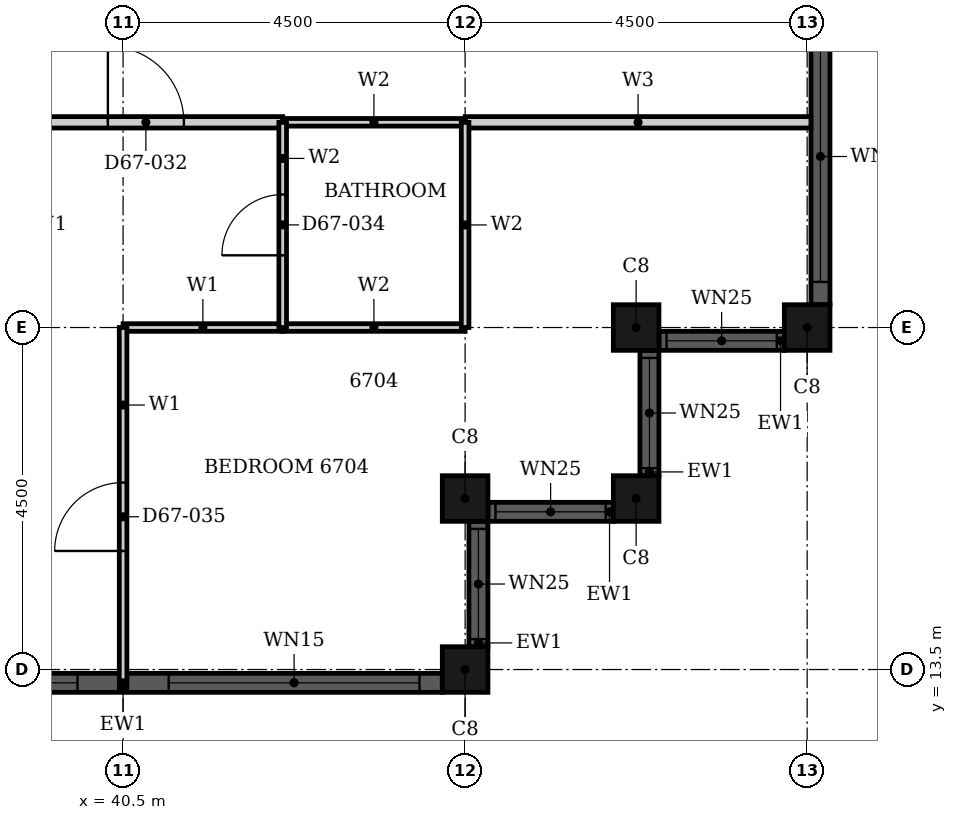
"""IFC4 building model, lengths in metres.
Left out: names, types, materials, properties, quantities, classifications, styles, units other than length and angle.
Written with IfcOpenShell. Run it as: python <this file> out.ifc"""

import sys

from ifc_helpers import new_model, si_unit, direction, frame, frame_2d, origin, origin_2d, place, context, subcontext, project, spatial, rectangle, hollow_rectangle, extrude, element, fill, save


model = new_model("IFC4")
c1 = context("Model", 3, precision=1e-05, world=origin(), true_north=direction((0.0, 1.0)))
c2 = subcontext(c1, "Body", "Model", "MODEL_VIEW")
j1 = project(units=[si_unit("LENGTHUNIT", "METRE"), si_unit("PLANEANGLEUNIT", "RADIAN")], contexts=[c1])
p1 = place(None, origin())
s1 = spatial("IfcSite", under=j1, at=p1, CompositionType="ELEMENT")
p2 = place(p1, origin())
s2 = spatial("IfcBuilding", under=s1, at=p2, CompositionType="ELEMENT")
p3 = place(p2, frame((0.0, 0.0, 263.8)))
s3 = spatial("IfcBuildingStorey", under=s2, at=p3, CompositionType="ELEMENT", Elevation=263.8)
for number, where, z_axis, x_axis in (
    (1, (45.0, 13.5, 0.0), (0.0, 0.0, 1.0), (1.0, 0.0, 0.0)),
    (2, (45.0, 15.75, 0.0), (0.0, 0.0, 1.0), (1.0, 0.0, 0.0)),
    (3, (47.25, 15.75, 0.0), (0.0, 0.0, 1.0), (1.0, 0.0, 0.0)),
    (4, (47.25, 18.0, 0.0), (0.0, 0.0, 1.0), (1.0, 0.0, 0.0)),
    (5, (49.5, 18.0, 0.0), (0.0, 0.0, 1.0), (1.0, 0.0, 0.0)),
):
    element("IfcColumn", number, at=place(p3, frame(where, z_axis=z_axis, x_axis=x_axis)), inside=s3, PredefinedType="COLUMN", context=c2, shape_type="SweptSolid", body=[
        extrude(hollow_rectangle(XDim=0.6, YDim=0.6, WallThickness=0.02, at=origin_2d()), origin(), (0.0, 0.0, 1.0), 3.7),
    ])
p4 = place(p3, frame((36.3, 13.325, 0.0), z_axis=(0.0, 0.0, 1.0), x_axis=(1.0, 0.0, 0.0)))
e6 = element("IfcWall", 6, at=p4, inside=s3, PredefinedType="SOLIDWALL", context=c2, shape_type="SweptSolid", body=[
    extrude(rectangle(XDim=8.4, YDim=0.25, at=frame_2d((4.2, 0.0))), origin(), (0.0, 0.0, 1.0), 3.7),
])
p5 = place(p4, frame((0.3, 0.0, 0.45)))
e7 = element("IfcOpeningElement", 7, at=p5, cuts=e6, PredefinedType="OPENING", context=c2, shape_type="SweptSolid", body=[
    extrude(rectangle(XDim=3.3, YDim=2.3, at=frame_2d((1.65, 1.15))), frame((0.0, 0.135, 0.0), z_axis=(0.0, -1.0, 0.0), x_axis=(1.0, 0.0, 0.0)), (0.0, 0.0, 1.0), 0.27),
])
p6 = place(p4, frame((4.8, 0.0, 0.45)))
e8 = element("IfcOpeningElement", 8, at=p6, cuts=e6, PredefinedType="OPENING", context=c2, shape_type="SweptSolid", body=[
    extrude(rectangle(XDim=3.3, YDim=2.3, at=frame_2d((1.65, 1.15))), frame((0.0, 0.135, 0.0), z_axis=(0.0, -1.0, 0.0), x_axis=(1.0, 0.0, 0.0)), (0.0, 0.0, 1.0), 0.27),
])
p7 = place(p3, frame((45.175, 13.8, 0.0), z_axis=(0.0, 0.0, 1.0), x_axis=(0.0, 1.0, 0.0)))
e9 = element("IfcWall", 9, at=p7, inside=s3, PredefinedType="SOLIDWALL", context=c2, shape_type="SweptSolid", body=[
    extrude(rectangle(XDim=1.65, YDim=0.25, at=frame_2d((0.825, 0.0))), origin(), (0.0, 0.0, 1.0), 3.7),
])
p8 = place(p7, frame((0.1, 0.0, 0.9)))
e10 = element("IfcOpeningElement", 10, at=p8, cuts=e9, PredefinedType="OPENING", context=c2, shape_type="SweptSolid", body=[
    extrude(rectangle(XDim=1.45, YDim=1.85, at=frame_2d((0.725, 0.925))), frame((0.0, 0.135, 0.0), z_axis=(0.0, -1.0, 0.0), x_axis=(1.0, 0.0, 0.0)), (0.0, 0.0, 1.0), 0.27),
])
p9 = place(p3, frame((45.3, 15.575, 0.0), z_axis=(0.0, 0.0, 1.0), x_axis=(1.0, 0.0, 0.0)))
e11 = element("IfcWall", 11, at=p9, inside=s3, PredefinedType="SOLIDWALL", context=c2, shape_type="SweptSolid", body=[
    extrude(rectangle(XDim=1.65, YDim=0.25, at=frame_2d((0.825, 0.0))), origin(), (0.0, 0.0, 1.0), 3.7),
])
p10 = place(p9, frame((0.1, 0.0, 0.9)))
e12 = element("IfcOpeningElement", 12, at=p10, cuts=e11, PredefinedType="OPENING", context=c2, shape_type="SweptSolid", body=[
    extrude(rectangle(XDim=1.45, YDim=1.85, at=frame_2d((0.725, 0.925))), frame((0.0, 0.135, 0.0), z_axis=(0.0, -1.0, 0.0), x_axis=(1.0, 0.0, 0.0)), (0.0, 0.0, 1.0), 0.27),
])
p11 = place(p3, frame((47.425, 16.05, 0.0), z_axis=(0.0, 0.0, 1.0), x_axis=(0.0, 1.0, 0.0)))
e13 = element("IfcWall", 13, at=p11, inside=s3, PredefinedType="SOLIDWALL", context=c2, shape_type="SweptSolid", body=[
    extrude(rectangle(XDim=1.65, YDim=0.25, at=frame_2d((0.825, 0.0))), origin(), (0.0, 0.0, 1.0), 3.7),
])
p12 = place(p11, frame((0.1, 0.0, 0.9)))
e14 = element("IfcOpeningElement", 14, at=p12, cuts=e13, PredefinedType="OPENING", context=c2, shape_type="SweptSolid", body=[
    extrude(rectangle(XDim=1.45, YDim=1.85, at=frame_2d((0.725, 0.925))), frame((0.0, 0.135, 0.0), z_axis=(0.0, -1.0, 0.0), x_axis=(1.0, 0.0, 0.0)), (0.0, 0.0, 1.0), 0.27),
])
p13 = place(p3, frame((47.55, 17.825, 0.0), z_axis=(0.0, 0.0, 1.0), x_axis=(1.0, 0.0, 0.0)))
e15 = element("IfcWall", 15, at=p13, inside=s3, PredefinedType="SOLIDWALL", context=c2, shape_type="SweptSolid", body=[
    extrude(rectangle(XDim=1.65, YDim=0.25, at=frame_2d((0.825, 0.0))), origin(), (0.0, 0.0, 1.0), 3.7),
])
p14 = place(p13, frame((0.1, 0.0, 0.9)))
e16 = element("IfcOpeningElement", 16, at=p14, cuts=e15, PredefinedType="OPENING", context=c2, shape_type="SweptSolid", body=[
    extrude(rectangle(XDim=1.45, YDim=1.85, at=frame_2d((0.725, 0.925))), frame((0.0, 0.135, 0.0), z_axis=(0.0, -1.0, 0.0), x_axis=(1.0, 0.0, 0.0)), (0.0, 0.0, 1.0), 0.27),
])
p15 = place(p3, frame((49.675, 18.3, 0.0), z_axis=(0.0, 0.0, 1.0), x_axis=(0.0, 1.0, 0.0)))
e17 = element("IfcWall", 17, at=p15, inside=s3, PredefinedType="SOLIDWALL", context=c2, shape_type="SweptSolid", body=[
    extrude(rectangle(XDim=8.4, YDim=0.25, at=frame_2d((4.2, 0.0))), origin(), (0.0, 0.0, 1.0), 3.7),
])
p16 = place(p15, frame((0.3, 0.0, 0.45)))
e18 = element("IfcOpeningElement", 18, at=p16, cuts=e17, PredefinedType="OPENING", context=c2, shape_type="SweptSolid", body=[
    extrude(rectangle(XDim=3.3, YDim=2.3, at=frame_2d((1.65, 1.15))), frame((0.0, 0.135, 0.0), z_axis=(0.0, -1.0, 0.0), x_axis=(1.0, 0.0, 0.0)), (0.0, 0.0, 1.0), 0.27),
])
p17 = place(p15, frame((4.8, 0.0, 0.45)))
e19 = element("IfcOpeningElement", 19, at=p17, cuts=e17, PredefinedType="OPENING", context=c2, shape_type="SweptSolid", body=[
    extrude(rectangle(XDim=3.3, YDim=2.3, at=frame_2d((1.65, 1.15))), frame((0.0, 0.135, 0.0), z_axis=(0.0, -1.0, 0.0), x_axis=(1.0, 0.0, 0.0)), (0.0, 0.0, 1.0), 0.27),
])
p18 = place(p3, frame((18.0, 20.7, 0.0), z_axis=(0.0, 0.0, 1.0), x_axis=(1.0, 0.0, 0.0)))
e20 = element("IfcWall", 20, at=p18, inside=s3, PredefinedType="PARTITIONING", context=c2, shape_type="SweptSolid", body=[
    extrude(rectangle(XDim=24.6, YDim=0.15, at=frame_2d((12.3, 0.0))), origin(), (0.0, 0.0, 1.0), 3.4),
])
p19 = place(p18, frame((4.0, 0.0, 0.0)))
e21 = element("IfcOpeningElement", 21, at=p19, cuts=e20, PredefinedType="OPENING", context=c2, shape_type="SweptSolid", body=[
    extrude(rectangle(XDim=1.0, YDim=2.1, at=frame_2d((0.5, 1.05))), frame((0.0, 0.085, 0.0), z_axis=(0.0, -1.0, 0.0), x_axis=(1.0, 0.0, 0.0)), (0.0, 0.0, 1.0), 0.17),
])
p20 = place(p18, frame((13.0, 0.0, 0.0)))
e22 = element("IfcOpeningElement", 22, at=p20, cuts=e20, PredefinedType="OPENING", context=c2, shape_type="SweptSolid", body=[
    extrude(rectangle(XDim=1.0, YDim=2.1, at=frame_2d((0.5, 1.05))), frame((0.0, 0.085, 0.0), z_axis=(0.0, -1.0, 0.0), x_axis=(1.0, 0.0, 0.0)), (0.0, 0.0, 1.0), 0.17),
])
p21 = place(p18, frame((22.3, 0.0, 0.0)))
e23 = element("IfcOpeningElement", 23, at=p21, cuts=e20, PredefinedType="OPENING", context=c2, shape_type="SweptSolid", body=[
    extrude(rectangle(XDim=1.0, YDim=2.2, at=frame_2d((0.5, 1.1))), frame((0.0, 0.085, 0.0), z_axis=(0.0, -1.0, 0.0), x_axis=(1.0, 0.0, 0.0)), (0.0, 0.0, 1.0), 0.17),
])
p22 = place(p3, frame((45.001, 20.7, 0.0), z_axis=(0.0, 0.0, 1.0), x_axis=(1.0, 0.0, 0.0)))
e24 = element("IfcWall", 24, at=p22, inside=s3, PredefinedType="PARTITIONING", context=c2, shape_type="SweptSolid", body=[
    extrude(rectangle(XDim=4.549, YDim=0.15, at=frame_2d((2.274, 0.0))), origin(), (0.0, 0.0, 1.0), 3.4),
])
p23 = place(p3, frame((40.5, 18.0, 0.0), z_axis=(0.0, 0.0, 1.0), x_axis=(1.0, 0.0, 0.0)))
e25 = element("IfcWall", 25, at=p23, inside=s3, PredefinedType="PARTITIONING", context=c2, shape_type="SweptSolid", body=[
    extrude(rectangle(XDim=2.1, YDim=0.1, at=frame_2d((1.05, 0.0))), origin(), (0.0, 0.0, 1.0), 3.4),
])
p24 = place(p3, frame((40.5, 13.26, 0.0), z_axis=(0.0, 0.0, 1.0), x_axis=(0.0, 1.0, 0.0)))
e26 = element("IfcWall", 26, at=p24, inside=s3, PredefinedType="PARTITIONING", context=c2, shape_type="SweptSolid", body=[
    extrude(rectangle(XDim=4.74, YDim=0.1, at=frame_2d((2.37, 0.0))), origin(), (0.0, 0.0, 1.0), 3.4),
])
p25 = place(p24, frame((1.8, 0.0, 0.0)))
e27 = element("IfcOpeningElement", 27, at=p25, cuts=e26, PredefinedType="OPENING", context=c2, shape_type="SweptSolid", body=[
    extrude(rectangle(XDim=0.9, YDim=2.1, at=frame_2d((0.45, 1.05))), frame((0.0, 0.06, 0.0), z_axis=(0.0, -1.0, 0.0), x_axis=(1.0, 0.0, 0.0)), (0.0, 0.0, 1.0), 0.12),
])
for number, where, z_axis, x_axis in (
    (28, (42.6, 18.0, 0.0), (0.0, 0.0, 1.0), (1.0, 0.0, 0.0)),
    (29, (42.6, 20.7, 0.0), (0.0, 0.0, 1.0), (1.0, 0.0, 0.0)),
):
    element("IfcWall", number, at=place(p3, frame(where, z_axis=z_axis, x_axis=x_axis)), inside=s3, PredefinedType="PARTITIONING", context=c2, shape_type="SweptSolid", body=[
        extrude(rectangle(XDim=2.4, YDim=0.1, at=frame_2d((1.2, 0.0))), origin(), (0.0, 0.0, 1.0), 3.4),
    ])
p26 = place(p3, frame((42.6, 18.0, 0.0), z_axis=(0.0, 0.0, 1.0), x_axis=(0.0, 1.0, 0.0)))
e30 = element("IfcWall", 30, at=p26, inside=s3, PredefinedType="PARTITIONING", context=c2, shape_type="SweptSolid", body=[
    extrude(rectangle(XDim=2.7, YDim=0.1, at=frame_2d((1.35, 0.0))), origin(), (0.0, 0.0, 1.0), 3.4),
])
p27 = place(p26, frame((0.95, 0.0, 0.0)))
e31 = element("IfcOpeningElement", 31, at=p27, cuts=e30, PredefinedType="OPENING", context=c2, shape_type="SweptSolid", body=[
    extrude(rectangle(XDim=0.8, YDim=2.1, at=frame_2d((0.4, 1.05))), frame((0.0, 0.06, 0.0), z_axis=(0.0, -1.0, 0.0), x_axis=(1.0, 0.0, 0.0)), (0.0, 0.0, 1.0), 0.12),
])
p28 = place(p3, frame((45.0, 18.0, 0.0), z_axis=(0.0, 0.0, 1.0), x_axis=(0.0, 1.0, 0.0)))
e32 = element("IfcWall", 32, at=p28, inside=s3, PredefinedType="PARTITIONING", context=c2, shape_type="SweptSolid", body=[
    extrude(rectangle(XDim=2.699, YDim=0.1, at=frame_2d((1.35, 0.0))), origin(), (0.0, 0.0, 1.0), 3.4),
])
p29 = place(p5, origin())
e33 = element("IfcWindow", 33, at=p29, inside=s3, PartitioningType="SINGLE_PANEL", PredefinedType="WINDOW", context=c2, shape_type="SweptSolid", body=[
    extrude(rectangle(XDim=3.3, YDim=2.3, at=frame_2d((1.65, 1.15))), frame((0.0, 0.03, 0.0), z_axis=(0.0, -1.0, 0.0), x_axis=(1.0, 0.0, 0.0)), (0.0, 0.0, 1.0), 0.06),
])
fill(e7, e33)
p30 = place(p6, origin())
e34 = element("IfcWindow", 34, at=p30, inside=s3, PartitioningType="SINGLE_PANEL", PredefinedType="WINDOW", context=c2, shape_type="SweptSolid", body=[
    extrude(rectangle(XDim=3.3, YDim=2.3, at=frame_2d((1.65, 1.15))), frame((0.0, 0.03, 0.0), z_axis=(0.0, -1.0, 0.0), x_axis=(1.0, 0.0, 0.0)), (0.0, 0.0, 1.0), 0.06),
])
fill(e8, e34)
p31 = place(p8, origin())
e35 = element("IfcWindow", 35, at=p31, inside=s3, PartitioningType="SINGLE_PANEL", PredefinedType="WINDOW", context=c2, shape_type="SweptSolid", body=[
    extrude(rectangle(XDim=1.45, YDim=1.85, at=frame_2d((0.725, 0.925))), frame((0.0, 0.03, 0.0), z_axis=(0.0, -1.0, 0.0), x_axis=(1.0, 0.0, 0.0)), (0.0, 0.0, 1.0), 0.06),
])
fill(e10, e35)
p32 = place(p10, origin())
e36 = element("IfcWindow", 36, at=p32, inside=s3, PartitioningType="SINGLE_PANEL", PredefinedType="WINDOW", context=c2, shape_type="SweptSolid", body=[
    extrude(rectangle(XDim=1.45, YDim=1.85, at=frame_2d((0.725, 0.925))), frame((0.0, 0.03, 0.0), z_axis=(0.0, -1.0, 0.0), x_axis=(1.0, 0.0, 0.0)), (0.0, 0.0, 1.0), 0.06),
])
fill(e12, e36)
p33 = place(p12, origin())
e37 = element("IfcWindow", 37, at=p33, inside=s3, PartitioningType="SINGLE_PANEL", PredefinedType="WINDOW", context=c2, shape_type="SweptSolid", body=[
    extrude(rectangle(XDim=1.45, YDim=1.85, at=frame_2d((0.725, 0.925))), frame((0.0, 0.03, 0.0), z_axis=(0.0, -1.0, 0.0), x_axis=(1.0, 0.0, 0.0)), (0.0, 0.0, 1.0), 0.06),
])
fill(e14, e37)
p34 = place(p14, origin())
e38 = element("IfcWindow", 38, at=p34, inside=s3, PartitioningType="SINGLE_PANEL", PredefinedType="WINDOW", context=c2, shape_type="SweptSolid", body=[
    extrude(rectangle(XDim=1.45, YDim=1.85, at=frame_2d((0.725, 0.925))), frame((0.0, 0.03, 0.0), z_axis=(0.0, -1.0, 0.0), x_axis=(1.0, 0.0, 0.0)), (0.0, 0.0, 1.0), 0.06),
])
fill(e16, e38)
p35 = place(p16, origin())
e39 = element("IfcWindow", 39, at=p35, inside=s3, PartitioningType="SINGLE_PANEL", PredefinedType="WINDOW", context=c2, shape_type="SweptSolid", body=[
    extrude(rectangle(XDim=3.3, YDim=2.3, at=frame_2d((1.65, 1.15))), frame((0.0, 0.03, 0.0), z_axis=(0.0, -1.0, 0.0), x_axis=(1.0, 0.0, 0.0)), (0.0, 0.0, 1.0), 0.06),
])
fill(e18, e39)
p36 = place(p21, origin())
e40 = element("IfcDoor", 40, at=p36, inside=s3, OperationType="SINGLE_SWING_RIGHT", PredefinedType="DOOR", context=c2, shape_type="SweptSolid", body=[
    extrude(rectangle(XDim=1.0, YDim=2.2, at=frame_2d((0.5, 1.1))), frame((0.0, 0.025, 0.0), z_axis=(0.0, -1.0, 0.0), x_axis=(1.0, 0.0, 0.0)), (0.0, 0.0, 1.0), 0.05),
])
fill(e23, e40)
p37 = place(p27, origin())
e41 = element("IfcDoor", 41, at=p37, inside=s3, OperationType="SINGLE_SWING_RIGHT", PredefinedType="DOOR", context=c2, shape_type="SweptSolid", body=[
    extrude(rectangle(XDim=0.8, YDim=2.1, at=frame_2d((0.4, 1.05))), frame((0.0, 0.025, 0.0), z_axis=(0.0, -1.0, 0.0), x_axis=(1.0, 0.0, 0.0)), (0.0, 0.0, 1.0), 0.05),
])
fill(e31, e41)
p38 = place(p25, origin())
e42 = element("IfcDoor", 42, at=p38, inside=s3, OperationType="SINGLE_SWING_RIGHT", PredefinedType="DOOR", context=c2, shape_type="SweptSolid", body=[
    extrude(rectangle(XDim=0.9, YDim=2.1, at=frame_2d((0.45, 1.05))), frame((0.0, 0.025, 0.0), z_axis=(0.0, -1.0, 0.0), x_axis=(1.0, 0.0, 0.0)), (0.0, 0.0, 1.0), 0.05),
])
fill(e27, e42)
save(model, sys.argv[1])
